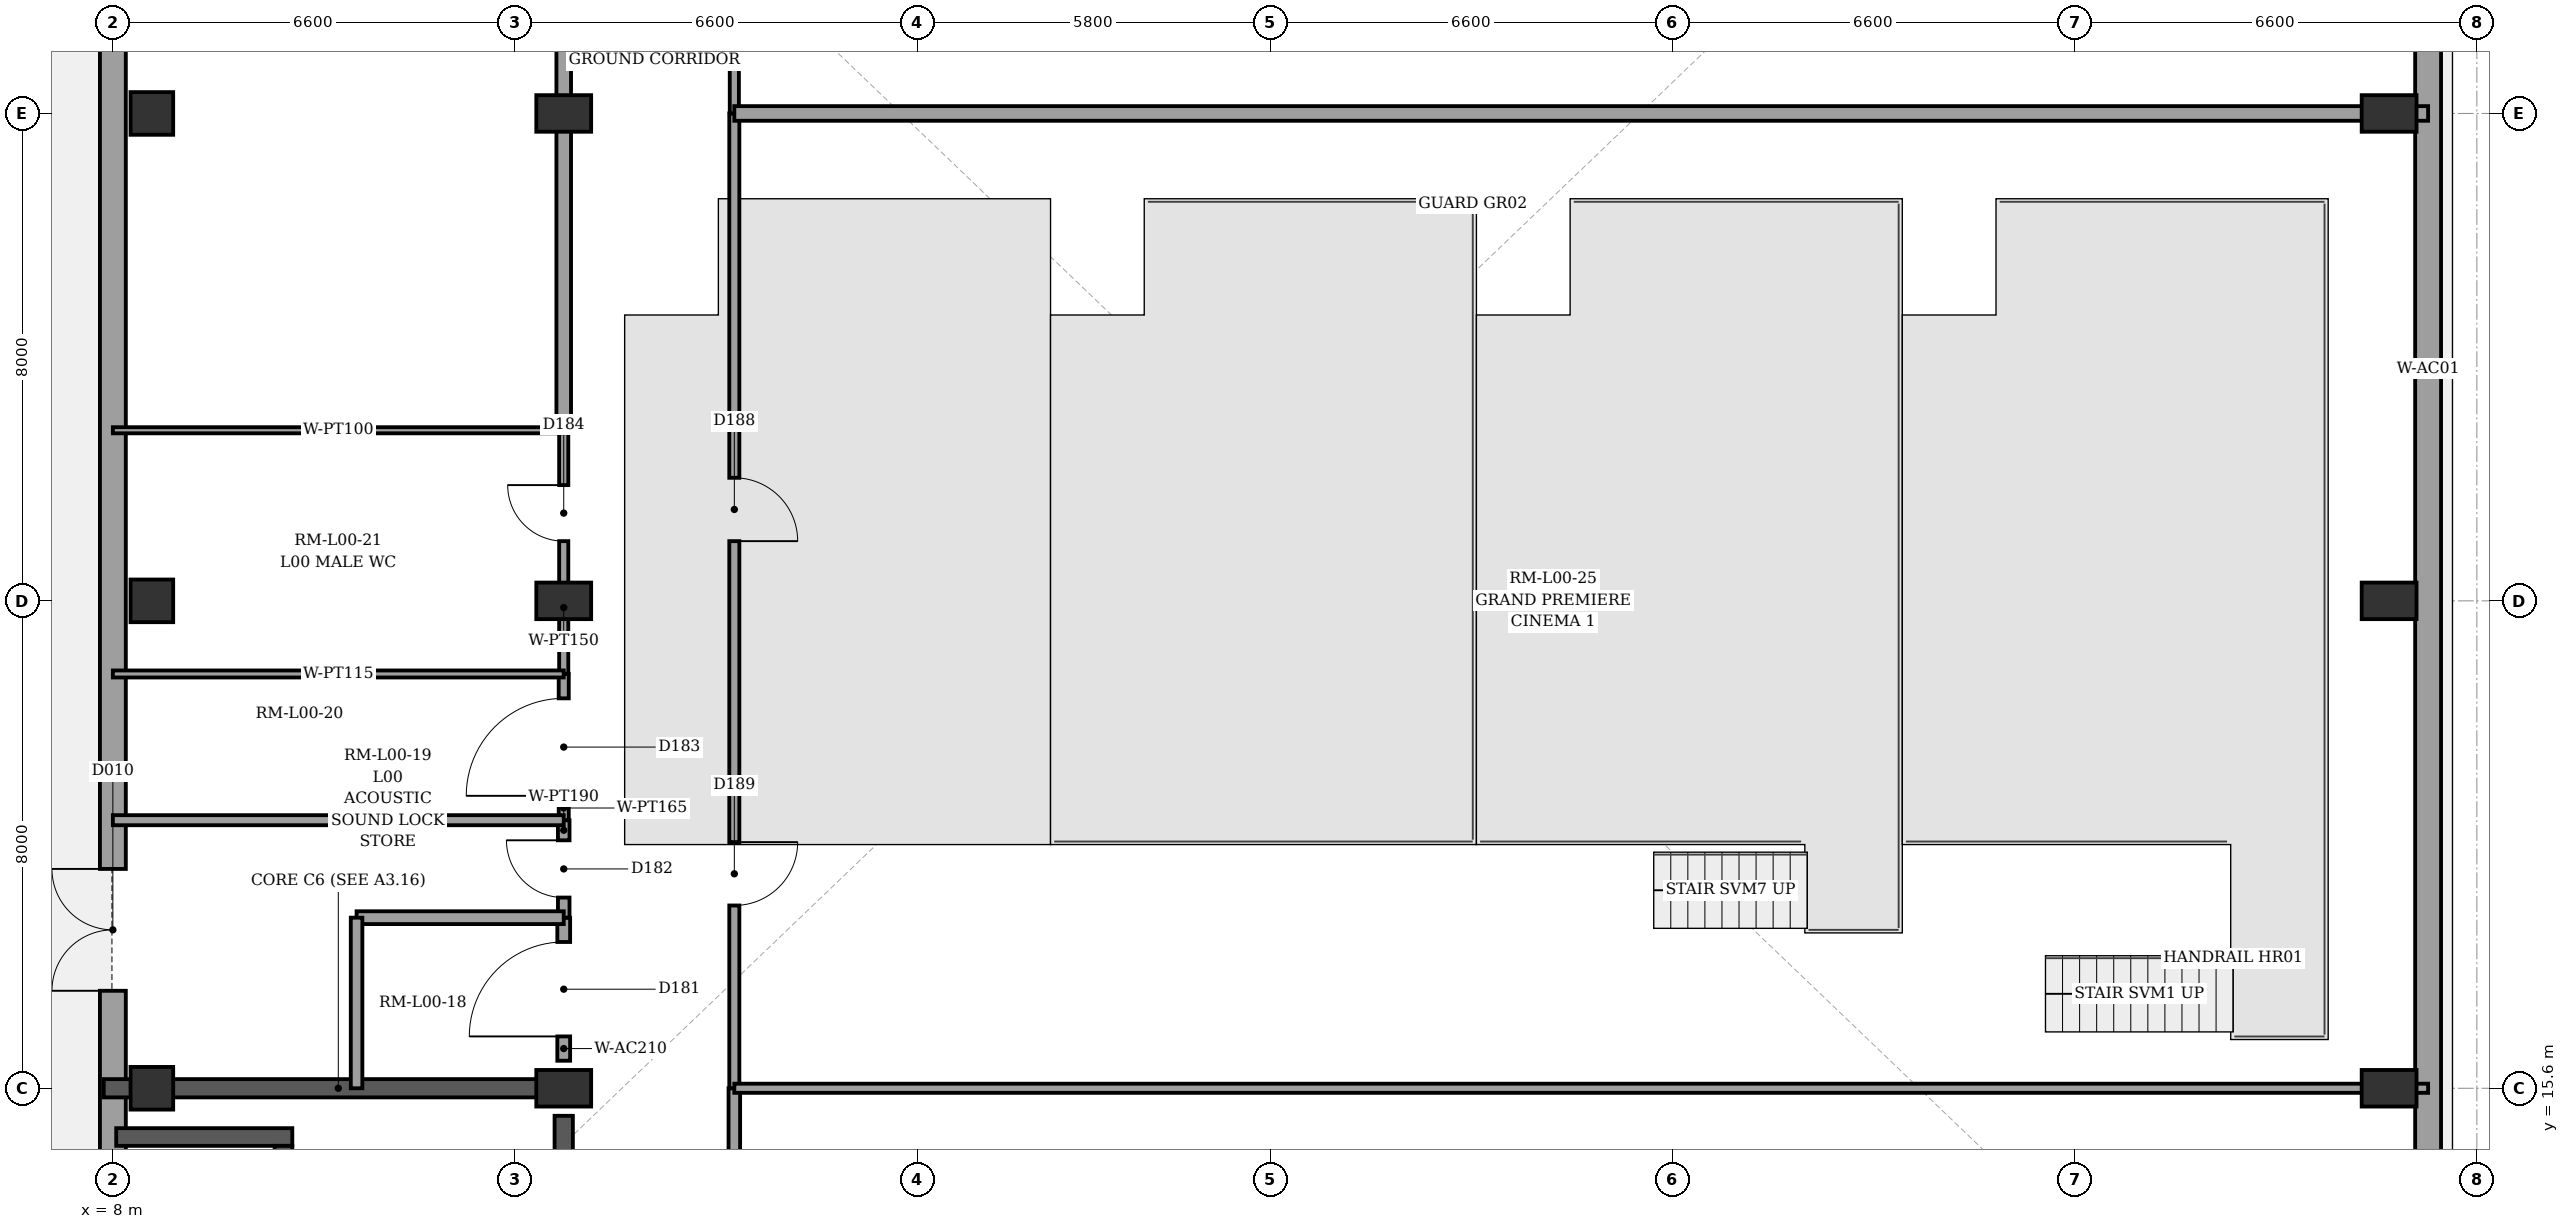
"""IFC4 building model, lengths in metres.
Left out: names, types, materials, properties, quantities, classifications, styles, units other than length and angle.
Written with IfcOpenShell. Run it as: python <this file> out.ifc"""

import sys

from ifc_helpers import new_model, si_unit, direction, frame, frame_2d, origin, origin_2d, place, context, subcontext, project, spatial, rectangle, extrude, element, fill, save


model = new_model("IFC4")
c1 = context("Model", 3, precision=1e-05, world=origin(), true_north=direction((0.0, 1.0)))
c2 = subcontext(c1, "Body", "Model", "MODEL_VIEW")
j1 = project(units=[si_unit("LENGTHUNIT", "METRE"), si_unit("PLANEANGLEUNIT", "RADIAN")], contexts=[c1])
p1 = place(None, origin())
s1 = spatial("IfcSite", under=j1, at=p1, CompositionType="ELEMENT")
p2 = place(p1, origin())
s2 = spatial("IfcBuilding", under=s1, at=p2, CompositionType="ELEMENT")
p3 = place(p2, origin())
s3 = spatial("IfcBuildingStorey", under=s2, at=p3, CompositionType="ELEMENT", Elevation=0.0)
for number, where, z_axis, x_axis in (
    (1, (8.64, 15.6, 0.0), (0.0, 0.0, 1.0), (1.0, 0.0, 0.0)),
    (2, (8.64, 23.6, 0.0), (0.0, 0.0, 1.0), (1.0, 0.0, 0.0)),
    (3, (8.64, 31.6, 0.0), (0.0, 0.0, 1.0), (1.0, 0.0, 0.0)),
):
    element("IfcColumn", number, at=place(p3, frame(where, z_axis=z_axis, x_axis=x_axis)), inside=s3, PredefinedType="COLUMN", context=c2, shape_type="SweptSolid", body=[
        extrude(rectangle(XDim=0.7, YDim=0.7, at=origin_2d()), origin(), (0.0, 0.0, 1.0), 5.4),
    ])
for number, where, z_axis, x_axis in (
    (4, (15.4, 15.6, 0.0), (0.0, 0.0, 1.0), (1.0, 0.0, 0.0)),
    (5, (15.4, 23.6, 0.0), (0.0, 0.0, 1.0), (1.0, 0.0, 0.0)),
    (6, (15.4, 31.6, 0.0), (0.0, 0.0, 1.0), (1.0, 0.0, 0.0)),
    (7, (45.36, 15.6, 0.0), (0.0, 0.0, 1.0), (1.0, 0.0, 0.0)),
    (8, (45.36, 23.6, 0.0), (0.0, 0.0, 1.0), (1.0, 0.0, 0.0)),
    (9, (45.36, 31.6, 0.0), (0.0, 0.0, 1.0), (1.0, 0.0, 0.0)),
):
    element("IfcColumn", number, at=place(p3, frame(where, z_axis=z_axis, x_axis=x_axis)), inside=s3, PredefinedType="COLUMN", context=c2, shape_type="SweptSolid", body=[
        extrude(rectangle(XDim=0.6, YDim=0.9, at=origin_2d()), origin(), (0.0, 0.0, 1.0), 5.4),
    ])
p4 = place(p3, frame((46.0, 63.46, 0.0), z_axis=(0.0, 0.0, 1.0), x_axis=(0.0, -1.0, 0.0)))
e10 = element("IfcWall", 10, at=p4, inside=s3, PredefinedType="SOLIDWALL", context=c2, shape_type="SweptSolid", body=[
    extrude(rectangle(XDim=55.72, YDim=0.425, at=frame_2d((27.86, 0.0))), origin(), (0.0, 0.0, 1.0), 5.14),
])
p5 = place(p4, frame((52.62, 0.0, 0.0)))
e11 = element("IfcOpeningElement", 11, at=p5, cuts=e10, PredefinedType="OPENING", context=c2, shape_type="SweptSolid", body=[
    extrude(rectangle(XDim=2.0, YDim=2.5, at=frame_2d((1.0, 1.25))), frame((0.0, 0.222, 0.0), z_axis=(0.0, -1.0, 0.0), x_axis=(1.0, 0.0, 0.0)), (0.0, 0.0, 1.0), 0.445),
])
p6 = place(p4, frame((10.86, 0.0, 0.0)))
e12 = element("IfcOpeningElement", 12, at=p6, cuts=e10, PredefinedType="OPENING", context=c2, shape_type="SweptSolid", body=[
    extrude(rectangle(XDim=2.0, YDim=2.5, at=frame_2d((1.0, 1.25))), frame((0.0, 0.222, 0.0), z_axis=(0.0, -1.0, 0.0), x_axis=(1.0, 0.0, 0.0)), (0.0, 0.0, 1.0), 0.445),
])
p7 = place(p3, frame((8.0, 7.74, 0.0), z_axis=(0.0, 0.0, 1.0), x_axis=(0.0, 1.0, 0.0)))
e13 = element("IfcWall", 13, at=p7, inside=s3, PredefinedType="SOLIDWALL", context=c2, shape_type="SweptSolid", body=[
    extrude(rectangle(XDim=55.72, YDim=0.425, at=frame_2d((27.86, 0.0))), origin(), (0.0, 0.0, 1.0), 5.14),
])
p8 = place(p7, frame((1.1, 0.0, 0.0)))
e14 = element("IfcOpeningElement", 14, at=p8, cuts=e13, PredefinedType="OPENING", context=c2, shape_type="SweptSolid", body=[
    extrude(rectangle(XDim=1.15, YDim=2.2, at=frame_2d((0.575, 1.1))), frame((0.0, 0.222, 0.0), z_axis=(0.0, -1.0, 0.0), x_axis=(1.0, 0.0, 0.0)), (0.0, 0.0, 1.0), 0.445),
])
p9 = place(p7, frame((9.46, 0.0, 0.0)))
e15 = element("IfcOpeningElement", 15, at=p9, cuts=e13, PredefinedType="OPENING", context=c2, shape_type="SweptSolid", body=[
    extrude(rectangle(XDim=2.0, YDim=2.5, at=frame_2d((1.0, 1.25))), frame((0.0, 0.222, 0.0), z_axis=(0.0, -1.0, 0.0), x_axis=(1.0, 0.0, 0.0)), (0.0, 0.0, 1.0), 0.445),
])
p10 = place(p3, frame((7.85, 15.6, 0.0), z_axis=(0.0, 0.0, 1.0), x_axis=(1.0, 0.0, 0.0)))
e16 = element("IfcWall", 16, at=p10, inside=s3, PredefinedType="SHEAR", context=c2, shape_type="SweptSolid", body=[
    extrude(rectangle(XDim=7.248, YDim=0.3, at=frame_2d((3.624, 0.0))), origin(), (0.0, 0.0, 1.0), 5.14),
])
p11 = place(p3, frame((15.4, 8.692, 0.0), z_axis=(0.0, 0.0, 1.0), x_axis=(0.0, 1.0, 0.0)))
e17 = element("IfcWall", 17, at=p11, inside=s3, PredefinedType="SHEAR", context=c2, shape_type="SweptSolid", body=[
    extrude(rectangle(XDim=6.456, YDim=0.3, at=frame_2d((3.228, 0.0))), origin(), (0.0, 0.0, 1.0), 5.14),
])
p12 = place(p11, frame((0.22, 0.0, 0.0)))
e18 = element("IfcOpeningElement", 18, at=p12, cuts=e17, PredefinedType="OPENING", context=c2, shape_type="SweptSolid", body=[
    extrude(rectangle(XDim=1.1, YDim=2.15, at=frame_2d((0.55, 1.075))), frame((0.0, 0.16, 0.0), z_axis=(0.0, -1.0, 0.0), x_axis=(1.0, 0.0, 0.0)), (0.0, 0.0, 1.0), 0.32),
])
p13 = place(p11, frame((4.133, 0.0, 0.0)))
e19 = element("IfcOpeningElement", 19, at=p13, cuts=e17, PredefinedType="OPENING", context=c2, shape_type="SweptSolid", body=[
    extrude(rectangle(XDim=1.15, YDim=2.2, at=frame_2d((0.575, 1.1))), frame((0.0, 0.16, 0.0), z_axis=(0.0, -1.0, 0.0), x_axis=(1.0, 0.0, 0.0)), (0.0, 0.0, 1.0), 0.32),
])
p14 = place(p3, frame((8.055, 14.8, 0.0), z_axis=(0.0, 0.0, 1.0), x_axis=(1.0, 0.0, 0.0)))
e20 = element("IfcWall", 20, at=p14, inside=s3, PredefinedType="SHEAR", context=c2, shape_type="SweptSolid", body=[
    extrude(rectangle(XDim=2.89, YDim=0.29, at=frame_2d((1.445, 0.0))), origin(), (0.0, 0.0, 1.0), 5.14),
])
p15 = place(p3, frame((10.8, 12.345, 0.0), z_axis=(0.0, 0.0, 1.0), x_axis=(0.0, 1.0, 0.0)))
e21 = element("IfcWall", 21, at=p15, inside=s3, PredefinedType="SHEAR", context=c2, shape_type="SweptSolid", body=[
    extrude(rectangle(XDim=2.31, YDim=0.29, at=frame_2d((1.155, 0.0))), origin(), (0.0, 0.0, 1.0), 5.14),
])
p16 = place(p15, frame((0.655, 0.0, 0.0)))
e22 = element("IfcOpeningElement", 22, at=p16, cuts=e21, PredefinedType="OPENING", context=c2, shape_type="SweptSolid", body=[
    extrude(rectangle(XDim=1.0, YDim=2.15, at=frame_2d((0.5, 1.075))), frame((0.0, 0.155, 0.0), z_axis=(0.0, -1.0, 0.0), x_axis=(1.0, 0.0, 0.0)), (0.0, 0.0, 1.0), 0.31),
])
p17 = place(p3, frame((15.4, 16.052, 0.0), z_axis=(0.0, 0.0, 1.0), x_axis=(0.0, 1.0, 0.0)))
e23 = element("IfcWall", 23, at=p17, inside=s3, PredefinedType="PARTITIONING", context=c2, shape_type="SweptSolid", body=[
    extrude(rectangle(XDim=2.348, YDim=0.21, at=frame_2d((1.174, 0.0))), origin(), (0.0, 0.0, 1.0), 4.29),
])
p18 = place(p17, frame((0.399, 0.0, 0.0)))
e24 = element("IfcOpeningElement", 24, at=p18, cuts=e23, PredefinedType="OPENING", context=c2, shape_type="SweptSolid", body=[
    extrude(rectangle(XDim=1.55, YDim=2.25, at=frame_2d((0.775, 1.125))), frame((0.0, 0.115, 0.0), z_axis=(0.0, -1.0, 0.0), x_axis=(1.0, 0.0, 0.0)), (0.0, 0.0, 1.0), 0.23),
])
p19 = place(p3, frame((15.4, 18.4, 0.0), z_axis=(0.0, 0.0, 1.0), x_axis=(0.0, 1.0, 0.0)))
e25 = element("IfcWall", 25, at=p19, inside=s3, PredefinedType="PARTITIONING", context=c2, shape_type="SweptSolid", body=[
    extrude(rectangle(XDim=1.6, YDim=0.19, at=frame_2d((0.8, 0.0))), origin(), (0.0, 0.0, 1.0), 4.29),
])
p20 = place(p19, frame((0.33, 0.0, 0.0)))
e26 = element("IfcOpeningElement", 26, at=p20, cuts=e25, PredefinedType="OPENING", context=c2, shape_type="SweptSolid", body=[
    extrude(rectangle(XDim=0.94, YDim=2.15, at=frame_2d((0.47, 1.075))), frame((0.0, 0.105, 0.0), z_axis=(0.0, -1.0, 0.0), x_axis=(1.0, 0.0, 0.0)), (0.0, 0.0, 1.0), 0.21),
])
p21 = place(p3, frame((15.4, 20.0, 0.0), z_axis=(0.0, 0.0, 1.0), x_axis=(0.0, 1.0, 0.0)))
e27 = element("IfcWall", 27, at=p21, inside=s3, PredefinedType="PARTITIONING", context=c2, shape_type="SweptSolid", body=[
    extrude(rectangle(XDim=2.4, YDim=0.165, at=frame_2d((1.2, 0.0))), origin(), (0.0, 0.0, 1.0), 4.29),
])
p22 = place(p21, frame((0.4, 0.0, 0.0)))
e28 = element("IfcOpeningElement", 28, at=p22, cuts=e27, PredefinedType="OPENING", context=c2, shape_type="SweptSolid", body=[
    extrude(rectangle(XDim=1.6, YDim=2.3, at=frame_2d((0.8, 1.15))), frame((0.0, 0.093, 0.0), z_axis=(0.0, -1.0, 0.0), x_axis=(1.0, 0.0, 0.0)), (0.0, 0.0, 1.0), 0.185),
])
p23 = place(p3, frame((15.4, 22.4, 0.0), z_axis=(0.0, 0.0, 1.0), x_axis=(0.0, 1.0, 0.0)))
e29 = element("IfcWall", 29, at=p23, inside=s3, PredefinedType="PARTITIONING", context=c2, shape_type="SweptSolid", body=[
    extrude(rectangle(XDim=4.0, YDim=0.15, at=frame_2d((2.0, 0.0))), origin(), (0.0, 0.0, 1.0), 4.29),
])
p24 = place(p23, frame((2.18, 0.0, 0.0)))
e30 = element("IfcOpeningElement", 30, at=p24, cuts=e29, PredefinedType="OPENING", context=c2, shape_type="SweptSolid", body=[
    extrude(rectangle(XDim=0.92, YDim=2.1, at=frame_2d((0.46, 1.05))), frame((0.0, 0.085, 0.0), z_axis=(0.0, -1.0, 0.0), x_axis=(1.0, 0.0, 0.0)), (0.0, 0.0, 1.0), 0.17),
])
p25 = place(p3, frame((15.4, 26.4, 0.0), z_axis=(0.0, 0.0, 1.0), x_axis=(0.0, 1.0, 0.0)))
e31 = element("IfcWall", 31, at=p25, inside=s3, PredefinedType="PARTITIONING", context=c2, shape_type="SweptSolid", body=[
    extrude(rectangle(XDim=17.6, YDim=0.24, at=frame_2d((8.8, 0.0))), origin(), (0.0, 0.0, 1.0), 4.29),
])
p26 = place(p25, frame((8.325, 0.0, 0.0)))
e32 = element("IfcOpeningElement", 32, at=p26, cuts=e31, PredefinedType="OPENING", context=c2, shape_type="SweptSolid", body=[
    extrude(rectangle(XDim=0.95, YDim=2.1, at=frame_2d((0.475, 1.05))), frame((0.0, 0.13, 0.0), z_axis=(0.0, -1.0, 0.0), x_axis=(1.0, 0.0, 0.0)), (0.0, 0.0, 1.0), 0.26),
])
p27 = place(p3, frame((18.2, 15.6, 0.0), z_axis=(0.0, 0.0, 1.0), x_axis=(0.0, -1.0, 0.0)))
e33 = element("IfcWall", 33, at=p27, inside=s3, PredefinedType="PARTITIONING", context=c2, shape_type="SweptSolid", body=[
    extrude(rectangle(XDim=8.0, YDim=0.19, at=frame_2d((4.0, 0.0))), origin(), (0.0, 0.0, 1.0), 5.14),
])
p28 = place(p27, frame((3.475, 0.0, 0.0)))
e34 = element("IfcOpeningElement", 34, at=p28, cuts=e33, PredefinedType="OPENING", context=c2, shape_type="SweptSolid", body=[
    extrude(rectangle(XDim=1.05, YDim=2.15, at=frame_2d((0.525, 1.075))), frame((0.0, 0.105, 0.0), z_axis=(0.0, -1.0, 0.0), x_axis=(1.0, 0.0, 0.0)), (0.0, 0.0, 1.0), 0.21),
])
p29 = place(p3, frame((18.2, 31.6, 0.0), z_axis=(0.0, 0.0, 1.0), x_axis=(0.0, -1.0, 0.0)))
e35 = element("IfcWall", 35, at=p29, inside=s3, PredefinedType="PARTITIONING", context=c2, shape_type="SweptSolid", body=[
    extrude(rectangle(XDim=16.0, YDim=0.165, at=frame_2d((8.0, 0.0))), origin(), (0.0, 0.0, 1.0), 5.14),
])
p30 = place(p29, frame((5.98, 0.0, 0.0)))
e36 = element("IfcOpeningElement", 36, at=p30, cuts=e35, PredefinedType="OPENING", context=c2, shape_type="SweptSolid", body=[
    extrude(rectangle(XDim=1.04, YDim=2.2, at=frame_2d((0.52, 1.1))), frame((0.0, 0.093, 0.0), z_axis=(0.0, -1.0, 0.0), x_axis=(1.0, 0.0, 0.0)), (0.0, 0.0, 1.0), 0.185),
])
p31 = place(p29, frame((11.96, 0.0, 0.0)))
e37 = element("IfcOpeningElement", 37, at=p31, cuts=e35, PredefinedType="OPENING", context=c2, shape_type="SweptSolid", body=[
    extrude(rectangle(XDim=1.04, YDim=2.2, at=frame_2d((0.52, 1.1))), frame((0.0, 0.093, 0.0), z_axis=(0.0, -1.0, 0.0), x_axis=(1.0, 0.0, 0.0)), (0.0, 0.0, 1.0), 0.185),
])
p32 = place(p3, frame((18.2, 47.6, 0.0), z_axis=(0.0, 0.0, 1.0), x_axis=(0.0, -1.0, 0.0)))
e38 = element("IfcWall", 38, at=p32, inside=s3, PredefinedType="PARTITIONING", context=c2, shape_type="SweptSolid", body=[
    extrude(rectangle(XDim=16.0, YDim=0.15, at=frame_2d((8.0, 0.0))), origin(), (0.0, 0.0, 1.0), 5.14),
])
p33 = place(p32, frame((6.18, 0.0, 0.0)))
e39 = element("IfcOpeningElement", 39, at=p33, cuts=e38, PredefinedType="OPENING", context=c2, shape_type="SweptSolid", body=[
    extrude(rectangle(XDim=0.98, YDim=2.1, at=frame_2d((0.49, 1.05))), frame((0.0, 0.085, 0.0), z_axis=(0.0, -1.0, 0.0), x_axis=(1.0, 0.0, 0.0)), (0.0, 0.0, 1.0), 0.17),
])
p34 = place(p32, frame((11.99, 0.0, 0.0)))
e40 = element("IfcOpeningElement", 40, at=p34, cuts=e38, PredefinedType="OPENING", context=c2, shape_type="SweptSolid", body=[
    extrude(rectangle(XDim=0.98, YDim=2.1, at=frame_2d((0.49, 1.05))), frame((0.0, 0.085, 0.0), z_axis=(0.0, -1.0, 0.0), x_axis=(1.0, 0.0, 0.0)), (0.0, 0.0, 1.0), 0.17),
])
p35 = place(p3, frame((12.0, 18.4, 0.0), z_axis=(0.0, 0.0, 1.0), x_axis=(1.0, 0.0, 0.0)))
e41 = element("IfcWall", 41, at=p35, inside=s3, PredefinedType="PARTITIONING", context=c2, shape_type="SweptSolid", body=[
    extrude(rectangle(XDim=3.4, YDim=0.21, at=frame_2d((1.7, 0.0))), origin(), (0.0, 0.0, 1.0), 5.14),
])
p36 = place(p3, frame((12.0, 15.6, 0.0), z_axis=(0.0, 0.0, 1.0), x_axis=(0.0, 1.0, 0.0)))
e42 = element("IfcWall", 42, at=p36, inside=s3, PredefinedType="PARTITIONING", context=c2, shape_type="SweptSolid", body=[
    extrude(rectangle(XDim=2.8, YDim=0.19, at=frame_2d((1.4, 0.0))), origin(), (0.0, 0.0, 1.0), 5.14),
])
p37 = place(p3, frame((8.0, 20.0, 0.0), z_axis=(0.0, 0.0, 1.0), x_axis=(1.0, 0.0, 0.0)))
e43 = element("IfcWall", 43, at=p37, inside=s3, PredefinedType="PARTITIONING", context=c2, shape_type="SweptSolid", body=[
    extrude(rectangle(XDim=7.4, YDim=0.165, at=frame_2d((3.7, 0.0))), origin(), (0.0, 0.0, 1.0), 5.14),
])
p38 = place(p3, frame((8.0, 22.4, 0.0), z_axis=(0.0, 0.0, 1.0), x_axis=(1.0, 0.0, 0.0)))
e44 = element("IfcWall", 44, at=p38, inside=s3, PredefinedType="PARTITIONING", context=c2, shape_type="SweptSolid", body=[
    extrude(rectangle(XDim=7.4, YDim=0.115, at=frame_2d((3.7, 0.0))), origin(), (0.0, 0.0, 1.0), 5.14),
])
p39 = place(p3, frame((8.0, 26.4, 0.0), z_axis=(0.0, 0.0, 1.0), x_axis=(1.0, 0.0, 0.0)))
e45 = element("IfcWall", 45, at=p39, inside=s3, PredefinedType="PARTITIONING", context=c2, shape_type="SweptSolid", body=[
    extrude(rectangle(XDim=7.4, YDim=0.1, at=frame_2d((3.7, 0.0))), origin(), (0.0, 0.0, 1.0), 5.14),
])
p40 = place(p3, frame((18.2, 15.6, 0.0), z_axis=(0.0, 0.0, 1.0), x_axis=(1.0, 0.0, 0.0)))
e46 = element("IfcWall", 46, at=p40, inside=s3, PredefinedType="PARTITIONING", context=c2, shape_type="SweptSolid", body=[
    extrude(rectangle(XDim=27.8, YDim=0.15, at=frame_2d((13.9, 0.0))), origin(), (0.0, 0.0, 1.0), 4.29),
])
p41 = place(p3, frame((18.2, 31.6, 0.0), z_axis=(0.0, 0.0, 1.0), x_axis=(1.0, 0.0, 0.0)))
e47 = element("IfcWall", 47, at=p41, inside=s3, PredefinedType="PARTITIONING", context=c2, shape_type="SweptSolid", body=[
    extrude(rectangle(XDim=27.8, YDim=0.24, at=frame_2d((13.9, 0.0))), origin(), (0.0, 0.0, 1.0), 4.29),
])
p42 = place(p9, origin())
e48 = element("IfcDoor", 48, at=p42, inside=s3, OperationType="DOUBLE_SWING_LEFT", PredefinedType="DOOR", context=c2, shape_type="SweptSolid", body=[
    extrude(rectangle(XDim=2.0, YDim=2.5, at=frame_2d((1.0, 1.25))), frame((0.0, 0.025, 0.0), z_axis=(0.0, -1.0, 0.0), x_axis=(1.0, 0.0, 0.0)), (0.0, 0.0, 1.0), 0.05),
])
fill(e15, e48)
p43 = place(p18, origin())
e49 = element("IfcDoor", 49, at=p43, inside=s3, OperationType="SINGLE_SWING_LEFT", PredefinedType="DOOR", context=c2, shape_type="SweptSolid", body=[
    extrude(rectangle(XDim=1.55, YDim=2.25, at=frame_2d((0.775, 1.125))), frame((0.0, 0.025, 0.0), z_axis=(0.0, -1.0, 0.0), x_axis=(1.0, 0.0, 0.0)), (0.0, 0.0, 1.0), 0.05),
])
fill(e24, e49)
p44 = place(p20, origin())
e50 = element("IfcDoor", 50, at=p44, inside=s3, OperationType="SINGLE_SWING_RIGHT", PredefinedType="DOOR", context=c2, shape_type="SweptSolid", body=[
    extrude(rectangle(XDim=0.94, YDim=2.15, at=frame_2d((0.47, 1.075))), frame((0.0, 0.025, 0.0), z_axis=(0.0, -1.0, 0.0), x_axis=(1.0, 0.0, 0.0)), (0.0, 0.0, 1.0), 0.05),
])
fill(e26, e50)
p45 = place(p22, origin())
e51 = element("IfcDoor", 51, at=p45, inside=s3, OperationType="SINGLE_SWING_LEFT", PredefinedType="DOOR", context=c2, shape_type="SweptSolid", body=[
    extrude(rectangle(XDim=1.6, YDim=2.3, at=frame_2d((0.8, 1.15))), frame((0.0, 0.025, 0.0), z_axis=(0.0, -1.0, 0.0), x_axis=(1.0, 0.0, 0.0)), (0.0, 0.0, 1.0), 0.05),
])
fill(e28, e51)
p46 = place(p24, origin())
e52 = element("IfcDoor", 52, at=p46, inside=s3, OperationType="SINGLE_SWING_RIGHT", PredefinedType="DOOR", context=c2, shape_type="SweptSolid", body=[
    extrude(rectangle(XDim=0.92, YDim=2.1, at=frame_2d((0.46, 1.05))), frame((0.0, 0.025, 0.0), z_axis=(0.0, -1.0, 0.0), x_axis=(1.0, 0.0, 0.0)), (0.0, 0.0, 1.0), 0.05),
])
fill(e30, e52)
p47 = place(p30, origin())
e53 = element("IfcDoor", 53, at=p47, inside=s3, OperationType="SINGLE_SWING_RIGHT", PredefinedType="DOOR", context=c2, shape_type="SweptSolid", body=[
    extrude(rectangle(XDim=1.04, YDim=2.2, at=frame_2d((0.52, 1.1))), frame((0.0, 0.025, 0.0), z_axis=(0.0, -1.0, 0.0), x_axis=(1.0, 0.0, 0.0)), (0.0, 0.0, 1.0), 0.05),
])
fill(e36, e53)
p48 = place(p31, origin())
e54 = element("IfcDoor", 54, at=p48, inside=s3, OperationType="SINGLE_SWING_LEFT", PredefinedType="DOOR", context=c2, shape_type="SweptSolid", body=[
    extrude(rectangle(XDim=1.04, YDim=2.2, at=frame_2d((0.52, 1.1))), frame((0.0, 0.025, 0.0), z_axis=(0.0, -1.0, 0.0), x_axis=(1.0, 0.0, 0.0)), (0.0, 0.0, 1.0), 0.05),
])
fill(e37, e54)
save(model, sys.argv[1])
